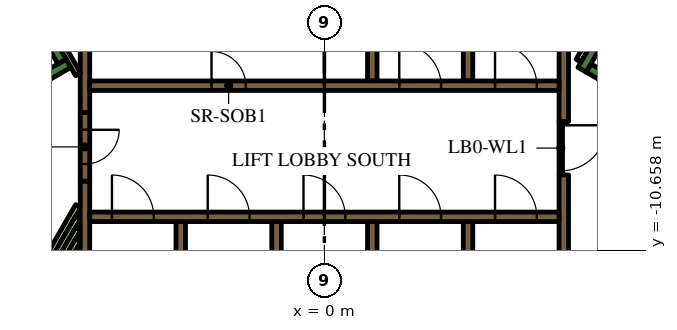
"""IFC4 building model, lengths in metres.
Left out: names, types, materials, properties, quantities, classifications, styles, units other than length and angle.
Written with IfcOpenShell. Run it as: python <this file> out.ifc"""

import sys

from ifc_helpers import new_model, si_unit, direction, frame, frame_2d, origin, place, context, subcontext, project, spatial, rectangle, extrude, element, fill, save


model = new_model("IFC4")
c1 = context("Model", 3, precision=1e-05, world=origin(), true_north=direction((0.0, 1.0)))
c2 = subcontext(c1, "Body", "Model", "MODEL_VIEW")
j1 = project(units=[si_unit("LENGTHUNIT", "METRE"), si_unit("PLANEANGLEUNIT", "RADIAN")], contexts=[c1])
p1 = place(None, origin())
s1 = spatial("IfcSite", under=j1, at=p1, CompositionType="ELEMENT")
p2 = place(p1, origin())
s2 = spatial("IfcBuilding", under=s1, at=p2, CompositionType="ELEMENT")
p3 = place(p2, frame((0.0, 0.0, 70.5)))
s3 = spatial("IfcBuildingStorey", under=s2, at=p3, CompositionType="ELEMENT", Elevation=70.5)
p4 = place(p3, frame((12.84, -9.261, 0.0), z_axis=(0.0, 0.0, 1.0), x_axis=(-0.866013990052, 0.500019768644, 0.0)))
e1 = element("IfcWall", 1, at=p4, inside=s3, PredefinedType="SOLIDWALL", context=c2, shape_type="SweptSolid", body=[
    extrude(rectangle(XDim=6.8, YDim=0.25, at=frame_2d((3.4, 0.0))), origin(), (0.0, 0.0, 1.0), 3.9),
])
p5 = place(p3, frame((6.78, -5.906, 0.0), z_axis=(0.0, 0.0, 1.0), x_axis=(0.500223362819, 0.865896406789, 0.0)))
e2 = element("IfcWall", 2, at=p5, inside=s3, PredefinedType="SOLIDWALL", context=c2, shape_type="SweptSolid", body=[
    extrude(rectangle(XDim=0.675, YDim=0.25, at=frame_2d((0.337, 0.0))), origin(), (0.0, 0.0, 1.0), 3.9),
])
p6 = place(p3, frame((-12.84, -9.261, 0.0), z_axis=(0.0, 0.0, 1.0), x_axis=(0.866016039709, 0.500016218704, 0.0)))
e3 = element("IfcWall", 3, at=p6, inside=s3, PredefinedType="SOLIDWALL", context=c2, shape_type="SweptSolid", body=[
    extrude(rectangle(XDim=7.05, YDim=0.25, at=frame_2d((3.525, 0.0))), origin(), (0.0, 0.0, 1.0), 3.9),
])
p7 = place(p3, frame((-6.905, -5.69, 0.0), z_axis=(0.0, 0.0, 1.0), x_axis=(-0.500402024738, 0.865793170242, 0.0)))
e4 = element("IfcWall", 4, at=p7, inside=s3, PredefinedType="SOLIDWALL", context=c2, shape_type="SweptSolid", body=[
    extrude(rectangle(XDim=0.425, YDim=0.25, at=frame_2d((0.212, 0.0))), origin(), (0.0, 0.0, 1.0), 3.9),
])
p8 = place(p3, frame((-3.78, -12.1, 0.0), z_axis=(0.0, 0.0, 1.0), x_axis=(0.0, 1.0, 0.0)))
e5 = element("IfcWall", 5, at=p8, inside=s3, PredefinedType="SOLIDWALL", context=c2, shape_type="SweptSolid", body=[
    extrude(rectangle(XDim=2.2, YDim=0.25, at=frame_2d((1.1, 0.0))), origin(), (0.0, 0.0, 1.0), 3.9),
])
p9 = place(p3, frame((-6.3, -12.1, 0.0), z_axis=(0.0, 0.0, 1.0), x_axis=(0.0, 1.0, 0.0)))
e6 = element("IfcWall", 6, at=p9, inside=s3, PredefinedType="SOLIDWALL", context=c2, shape_type="SweptSolid", body=[
    extrude(rectangle(XDim=3.265, YDim=0.25, at=frame_2d((1.632, 0.0))), origin(), (0.0, 0.0, 1.0), 3.9),
])
for number, where, z_axis, x_axis in (
    (7, (3.78, -4.0, 0.0), (0.0, 0.0, 1.0), (0.0, -1.0, 0.0)),
    (8, (1.26, -4.0, 0.0), (0.0, 0.0, 1.0), (0.0, -1.0, 0.0)),
):
    element("IfcWall", number, at=place(p3, frame(where, z_axis=z_axis, x_axis=x_axis)), inside=s3, PredefinedType="SOLIDWALL", context=c2, shape_type="SweptSolid", body=[
        extrude(rectangle(XDim=2.2, YDim=0.25, at=frame_2d((1.1, 0.0))), origin(), (0.0, 0.0, 1.0), 3.9),
    ])
p10 = place(p3, frame((-6.3, -7.035, 0.0), z_axis=(0.0, 0.0, 1.0), x_axis=(0.0, 1.0, 0.0)))
e9 = element("IfcWall", 9, at=p10, inside=s3, PredefinedType="SOLIDWALL", context=c2, shape_type="SweptSolid", body=[
    extrude(rectangle(XDim=3.285, YDim=0.25, at=frame_2d((1.643, 0.0))), origin(), (0.0, 0.0, 1.0), 3.9),
])
p11 = place(p3, frame((6.3, -7.27, 0.0), z_axis=(0.0, 0.0, 1.0), x_axis=(0.0, 1.0, 0.0)))
e10 = element("IfcWall", 10, at=p11, inside=s3, PredefinedType="SOLIDWALL", context=c2, shape_type="SweptSolid", body=[
    extrude(rectangle(XDim=3.586, YDim=0.25, at=frame_2d((1.793, 0.0))), origin(), (0.0, 0.0, 1.0), 3.9),
])
p12 = place(p3, frame((6.3, -12.1, 0.0), z_axis=(0.0, 0.0, 1.0), x_axis=(0.0, 1.0, 0.0)))
e11 = element("IfcWall", 11, at=p12, inside=s3, PredefinedType="SOLIDWALL", context=c2, shape_type="SweptSolid", body=[
    extrude(rectangle(XDim=3.428, YDim=0.25, at=frame_2d((1.714, 0.0))), origin(), (0.0, 0.0, 1.0), 3.9),
])
for number, where, z_axis, x_axis in (
    (12, (3.78, -12.1, 0.0), (0.0, 0.0, 1.0), (0.0, 1.0, 0.0)),
    (13, (1.26, -12.1, 0.0), (0.0, 0.0, 1.0), (0.0, 1.0, 0.0)),
    (14, (-1.26, -12.1, 0.0), (0.0, 0.0, 1.0), (0.0, 1.0, 0.0)),
):
    element("IfcWall", number, at=place(p3, frame(where, z_axis=z_axis, x_axis=x_axis)), inside=s3, PredefinedType="SOLIDWALL", context=c2, shape_type="SweptSolid", body=[
        extrude(rectangle(XDim=2.2, YDim=0.25, at=frame_2d((1.1, 0.0))), origin(), (0.0, 0.0, 1.0), 3.9),
    ])
p13 = place(p3, frame((-7.968, -12.068, 0.0), z_axis=(0.0, 0.0, 1.0), x_axis=(0.500013701029, 0.866017493347, 0.0)))
e15 = element("IfcWall", 15, at=p13, inside=s3, PredefinedType="PARTITIONING", context=c2, shape_type="SweptSolid", body=[
    extrude(rectangle(XDim=2.975, YDim=0.15, at=frame_2d((1.488, 0.0))), origin(), (0.0, 0.0, 1.0), 2.75),
])
p14 = place(p3, frame((-7.794, -12.068, 0.0), z_axis=(0.0, 0.0, 1.0), x_axis=(0.499985098601, 0.86603400694, 0.0)))
e16 = element("IfcWall", 16, at=p14, inside=s3, PredefinedType="PARTITIONING", context=c2, shape_type="SweptSolid", body=[
    extrude(rectangle(XDim=2.628, YDim=0.15, at=frame_2d((1.314, 0.0))), origin(), (0.0, 0.0, 1.0), 2.75),
])
p15 = place(p3, frame((-7.621, -12.068, 0.0), z_axis=(0.0, 0.0, 1.0), x_axis=(0.500028047758, 0.866009209798, 0.0)))
e17 = element("IfcWall", 17, at=p15, inside=s3, PredefinedType="PARTITIONING", context=c2, shape_type="SweptSolid", body=[
    extrude(rectangle(XDim=2.282, YDim=0.15, at=frame_2d((1.141, 0.0))), origin(), (0.0, 0.0, 1.0), 2.75),
])
p16 = place(p3, frame((-7.448, -12.068, 0.0), z_axis=(0.0, 0.0, 1.0), x_axis=(0.500031751504, 0.866007071269, 0.0)))
e18 = element("IfcWall", 18, at=p16, inside=s3, PredefinedType="PARTITIONING", context=c2, shape_type="SweptSolid", body=[
    extrude(rectangle(XDim=1.936, YDim=0.15, at=frame_2d((0.968, 0.0))), origin(), (0.0, 0.0, 1.0), 2.75),
])
p17 = place(p3, frame((-6.48, -6.027, 0.0), z_axis=(0.0, 0.0, 1.0), x_axis=(-0.499927229454, 0.866067413802, 0.0)))
e19 = element("IfcWall", 19, at=p17, inside=s3, PredefinedType="PARTITIONING", context=c2, shape_type="SweptSolid", body=[
    extrude(rectangle(XDim=0.929, YDim=0.15, at=frame_2d((0.464, 0.0))), origin(), (0.0, 0.0, 1.0), 3.9),
])
p18 = place(p3, frame((6.945, -5.222, 0.0), z_axis=(0.0, 0.0, 1.0), x_axis=(-0.499818422106, -0.866130212453, 0.0)))
e20 = element("IfcWall", 20, at=p18, inside=s3, PredefinedType="PARTITIONING", context=c2, shape_type="SweptSolid", body=[
    extrude(rectangle(XDim=0.514, YDim=0.15, at=frame_2d((0.257, 0.0))), origin(), (0.0, 0.0, 1.0), 2.75),
])
p19 = place(p3, frame((-6.175, -9.775, 0.0), z_axis=(0.0, 0.0, 1.0), x_axis=(1.0, 0.0, 0.0)))
e21 = element("IfcWall", 21, at=p19, inside=s3, PredefinedType="SOLIDWALL", context=c2, shape_type="SweptSolid", body=[
    extrude(rectangle(XDim=12.35, YDim=0.25, at=frame_2d((6.175, 0.0))), origin(), (0.0, 0.0, 1.0), 3.9),
])
p20 = place(p19, frame((0.585, 0.0, 0.0)))
e22 = element("IfcOpeningElement", 22, at=p20, cuts=e21, PredefinedType="OPENING", context=c2, shape_type="SweptSolid", body=[
    extrude(rectangle(XDim=1.1, YDim=2.1, at=frame_2d((0.55, 1.05))), frame((0.0, 0.135, 0.0), z_axis=(0.0, -1.0, 0.0), x_axis=(1.0, 0.0, 0.0)), (0.0, 0.0, 1.0), 0.27),
])
p21 = place(p19, frame((3.105, 0.0, 0.0)))
e23 = element("IfcOpeningElement", 23, at=p21, cuts=e21, PredefinedType="OPENING", context=c2, shape_type="SweptSolid", body=[
    extrude(rectangle(XDim=1.1, YDim=2.1, at=frame_2d((0.55, 1.05))), frame((0.0, 0.135, 0.0), z_axis=(0.0, -1.0, 0.0), x_axis=(1.0, 0.0, 0.0)), (0.0, 0.0, 1.0), 0.27),
])
p22 = place(p19, frame((5.625, 0.0, 0.0)))
e24 = element("IfcOpeningElement", 24, at=p22, cuts=e21, PredefinedType="OPENING", context=c2, shape_type="SweptSolid", body=[
    extrude(rectangle(XDim=1.1, YDim=2.1, at=frame_2d((0.55, 1.05))), frame((0.0, 0.135, 0.0), z_axis=(0.0, -1.0, 0.0), x_axis=(1.0, 0.0, 0.0)), (0.0, 0.0, 1.0), 0.27),
])
p23 = place(p19, frame((8.145, 0.0, 0.0)))
e25 = element("IfcOpeningElement", 25, at=p23, cuts=e21, PredefinedType="OPENING", context=c2, shape_type="SweptSolid", body=[
    extrude(rectangle(XDim=1.1, YDim=2.1, at=frame_2d((0.55, 1.05))), frame((0.0, 0.135, 0.0), z_axis=(0.0, -1.0, 0.0), x_axis=(1.0, 0.0, 0.0)), (0.0, 0.0, 1.0), 0.27),
])
p24 = place(p19, frame((10.665, 0.0, 0.0)))
e26 = element("IfcOpeningElement", 26, at=p24, cuts=e21, PredefinedType="OPENING", context=c2, shape_type="SweptSolid", body=[
    extrude(rectangle(XDim=1.1, YDim=2.1, at=frame_2d((0.55, 1.05))), frame((0.0, 0.135, 0.0), z_axis=(0.0, -1.0, 0.0), x_axis=(1.0, 0.0, 0.0)), (0.0, 0.0, 1.0), 0.27),
])
p25 = place(p3, frame((-6.175, -6.325, 0.0), z_axis=(0.0, 0.0, 1.0), x_axis=(1.0, 0.0, 0.0)))
e27 = element("IfcWall", 27, at=p25, inside=s3, PredefinedType="SOLIDWALL", context=c2, shape_type="SweptSolid", body=[
    extrude(rectangle(XDim=12.35, YDim=0.25, at=frame_2d((6.175, 0.0))), origin(), (0.0, 0.0, 1.0), 3.9),
])
p26 = place(p25, frame((3.205, 0.0, 0.0)))
e28 = element("IfcOpeningElement", 28, at=p26, cuts=e27, PredefinedType="OPENING", context=c2, shape_type="SweptSolid", body=[
    extrude(rectangle(XDim=0.9, YDim=2.1, at=frame_2d((0.45, 1.05))), frame((0.0, 0.135, 0.0), z_axis=(0.0, -1.0, 0.0), x_axis=(1.0, 0.0, 0.0)), (0.0, 0.0, 1.0), 0.27),
])
p27 = place(p25, frame((8.145, 0.0, 0.0)))
e29 = element("IfcOpeningElement", 29, at=p27, cuts=e27, PredefinedType="OPENING", context=c2, shape_type="SweptSolid", body=[
    extrude(rectangle(XDim=1.1, YDim=2.1, at=frame_2d((0.55, 1.05))), frame((0.0, 0.135, 0.0), z_axis=(0.0, -1.0, 0.0), x_axis=(1.0, 0.0, 0.0)), (0.0, 0.0, 1.0), 0.27),
])
p28 = place(p25, frame((10.665, 0.0, 0.0)))
e30 = element("IfcOpeningElement", 30, at=p28, cuts=e27, PredefinedType="OPENING", context=c2, shape_type="SweptSolid", body=[
    extrude(rectangle(XDim=1.1, YDim=2.1, at=frame_2d((0.55, 1.05))), frame((0.0, 0.135, 0.0), z_axis=(0.0, -1.0, 0.0), x_axis=(1.0, 0.0, 0.0)), (0.0, 0.0, 1.0), 0.27),
])
p29 = place(p3, frame((-6.3, -7.035, 0.0), z_axis=(0.0, 0.0, 1.0), x_axis=(0.0, -1.0, 0.0)))
e31 = element("IfcWall", 31, at=p29, inside=s3, PredefinedType="SOLIDWALL", context=c2, shape_type="SweptSolid", body=[
    extrude(rectangle(XDim=1.8, YDim=0.25, at=frame_2d((0.9, 0.0))), origin(), (0.0, 0.0, 1.0), 3.9),
])
p30 = place(p29, frame((0.45, 0.0, 0.0)))
e32 = element("IfcOpeningElement", 32, at=p30, cuts=e31, PredefinedType="OPENING", context=c2, shape_type="SweptSolid", body=[
    extrude(rectangle(XDim=0.9, YDim=2.1, at=frame_2d((0.45, 1.05))), frame((0.0, 0.135, 0.0), z_axis=(0.0, -1.0, 0.0), x_axis=(1.0, 0.0, 0.0)), (0.0, 0.0, 1.0), 0.27),
])
p31 = place(p3, frame((6.22, -7.266, 0.0), z_axis=(0.0, 0.0, 1.0), x_axis=(0.0, -1.0, 0.0)))
e33 = element("IfcWall", 33, at=p31, inside=s3, PredefinedType="PARTITIONING", context=c2, shape_type="SweptSolid", body=[
    extrude(rectangle(XDim=1.4, YDim=0.09, at=frame_2d((0.7, 0.0))), origin(), (0.0, 0.0, 1.0), 2.75),
])
p32 = place(p31, frame((0.1, 0.0, 0.0)))
e34 = element("IfcOpeningElement", 34, at=p32, cuts=e33, PredefinedType="OPENING", context=c2, shape_type="SweptSolid", body=[
    extrude(rectangle(XDim=1.2, YDim=2.1, at=frame_2d((0.6, 1.05))), frame((0.0, 0.055, 0.0), z_axis=(0.0, -1.0, 0.0), x_axis=(1.0, 0.0, 0.0)), (0.0, 0.0, 1.0), 0.11),
])
p33 = place(p20, origin())
e35 = element("IfcDoor", 35, at=p33, inside=s3, OperationType="DOUBLE_DOOR_SLIDING", PredefinedType="DOOR", context=c2, shape_type="SweptSolid", body=[
    extrude(rectangle(XDim=1.1, YDim=2.1, at=frame_2d((0.55, 1.05))), frame((0.0, 0.025, 0.0), z_axis=(0.0, -1.0, 0.0), x_axis=(1.0, 0.0, 0.0)), (0.0, 0.0, 1.0), 0.05),
])
fill(e22, e35)
p34 = place(p21, origin())
e36 = element("IfcDoor", 36, at=p34, inside=s3, OperationType="DOUBLE_DOOR_SLIDING", PredefinedType="DOOR", context=c2, shape_type="SweptSolid", body=[
    extrude(rectangle(XDim=1.1, YDim=2.1, at=frame_2d((0.55, 1.05))), frame((0.0, 0.025, 0.0), z_axis=(0.0, -1.0, 0.0), x_axis=(1.0, 0.0, 0.0)), (0.0, 0.0, 1.0), 0.05),
])
fill(e23, e36)
p35 = place(p22, origin())
e37 = element("IfcDoor", 37, at=p35, inside=s3, OperationType="DOUBLE_DOOR_SLIDING", PredefinedType="DOOR", context=c2, shape_type="SweptSolid", body=[
    extrude(rectangle(XDim=1.1, YDim=2.1, at=frame_2d((0.55, 1.05))), frame((0.0, 0.025, 0.0), z_axis=(0.0, -1.0, 0.0), x_axis=(1.0, 0.0, 0.0)), (0.0, 0.0, 1.0), 0.05),
])
fill(e24, e37)
p36 = place(p23, origin())
e38 = element("IfcDoor", 38, at=p36, inside=s3, OperationType="DOUBLE_DOOR_SLIDING", PredefinedType="DOOR", context=c2, shape_type="SweptSolid", body=[
    extrude(rectangle(XDim=1.1, YDim=2.1, at=frame_2d((0.55, 1.05))), frame((0.0, 0.025, 0.0), z_axis=(0.0, -1.0, 0.0), x_axis=(1.0, 0.0, 0.0)), (0.0, 0.0, 1.0), 0.05),
])
fill(e25, e38)
p37 = place(p24, origin())
e39 = element("IfcDoor", 39, at=p37, inside=s3, OperationType="DOUBLE_DOOR_SLIDING", PredefinedType="DOOR", context=c2, shape_type="SweptSolid", body=[
    extrude(rectangle(XDim=1.1, YDim=2.1, at=frame_2d((0.55, 1.05))), frame((0.0, 0.025, 0.0), z_axis=(0.0, -1.0, 0.0), x_axis=(1.0, 0.0, 0.0)), (0.0, 0.0, 1.0), 0.05),
])
fill(e26, e39)
p38 = place(p26, origin())
e40 = element("IfcDoor", 40, at=p38, inside=s3, OperationType="SINGLE_SWING_LEFT", PredefinedType="DOOR", context=c2, shape_type="SweptSolid", body=[
    extrude(rectangle(XDim=0.9, YDim=2.1, at=frame_2d((0.45, 1.05))), frame((0.0, 0.025, 0.0), z_axis=(0.0, -1.0, 0.0), x_axis=(1.0, 0.0, 0.0)), (0.0, 0.0, 1.0), 0.05),
])
fill(e28, e40)
p39 = place(p27, origin())
e41 = element("IfcDoor", 41, at=p39, inside=s3, OperationType="DOUBLE_DOOR_SLIDING", PredefinedType="DOOR", context=c2, shape_type="SweptSolid", body=[
    extrude(rectangle(XDim=1.1, YDim=2.1, at=frame_2d((0.55, 1.05))), frame((0.0, 0.025, 0.0), z_axis=(0.0, -1.0, 0.0), x_axis=(1.0, 0.0, 0.0)), (0.0, 0.0, 1.0), 0.05),
])
fill(e29, e41)
p40 = place(p28, origin())
e42 = element("IfcDoor", 42, at=p40, inside=s3, OperationType="DOUBLE_DOOR_SLIDING", PredefinedType="DOOR", context=c2, shape_type="SweptSolid", body=[
    extrude(rectangle(XDim=1.1, YDim=2.1, at=frame_2d((0.55, 1.05))), frame((0.0, 0.025, 0.0), z_axis=(0.0, -1.0, 0.0), x_axis=(1.0, 0.0, 0.0)), (0.0, 0.0, 1.0), 0.05),
])
fill(e30, e42)
p41 = place(p30, origin())
e43 = element("IfcDoor", 43, at=p41, inside=s3, OperationType="SINGLE_SWING_LEFT", PredefinedType="DOOR", context=c2, shape_type="SweptSolid", body=[
    extrude(rectangle(XDim=0.9, YDim=2.1, at=frame_2d((0.45, 1.05))), frame((0.0, 0.025, 0.0), z_axis=(0.0, -1.0, 0.0), x_axis=(1.0, 0.0, 0.0)), (0.0, 0.0, 1.0), 0.05),
])
fill(e32, e43)
p42 = place(p32, origin())
e44 = element("IfcDoor", 44, at=p42, inside=s3, OperationType="SINGLE_SWING_LEFT", PredefinedType="DOOR", context=c2, shape_type="SweptSolid", body=[
    extrude(rectangle(XDim=1.2, YDim=2.1, at=frame_2d((0.6, 1.05))), frame((0.0, 0.025, 0.0), z_axis=(0.0, -1.0, 0.0), x_axis=(1.0, 0.0, 0.0)), (0.0, 0.0, 1.0), 0.05),
])
fill(e34, e44)
save(model, sys.argv[1])
